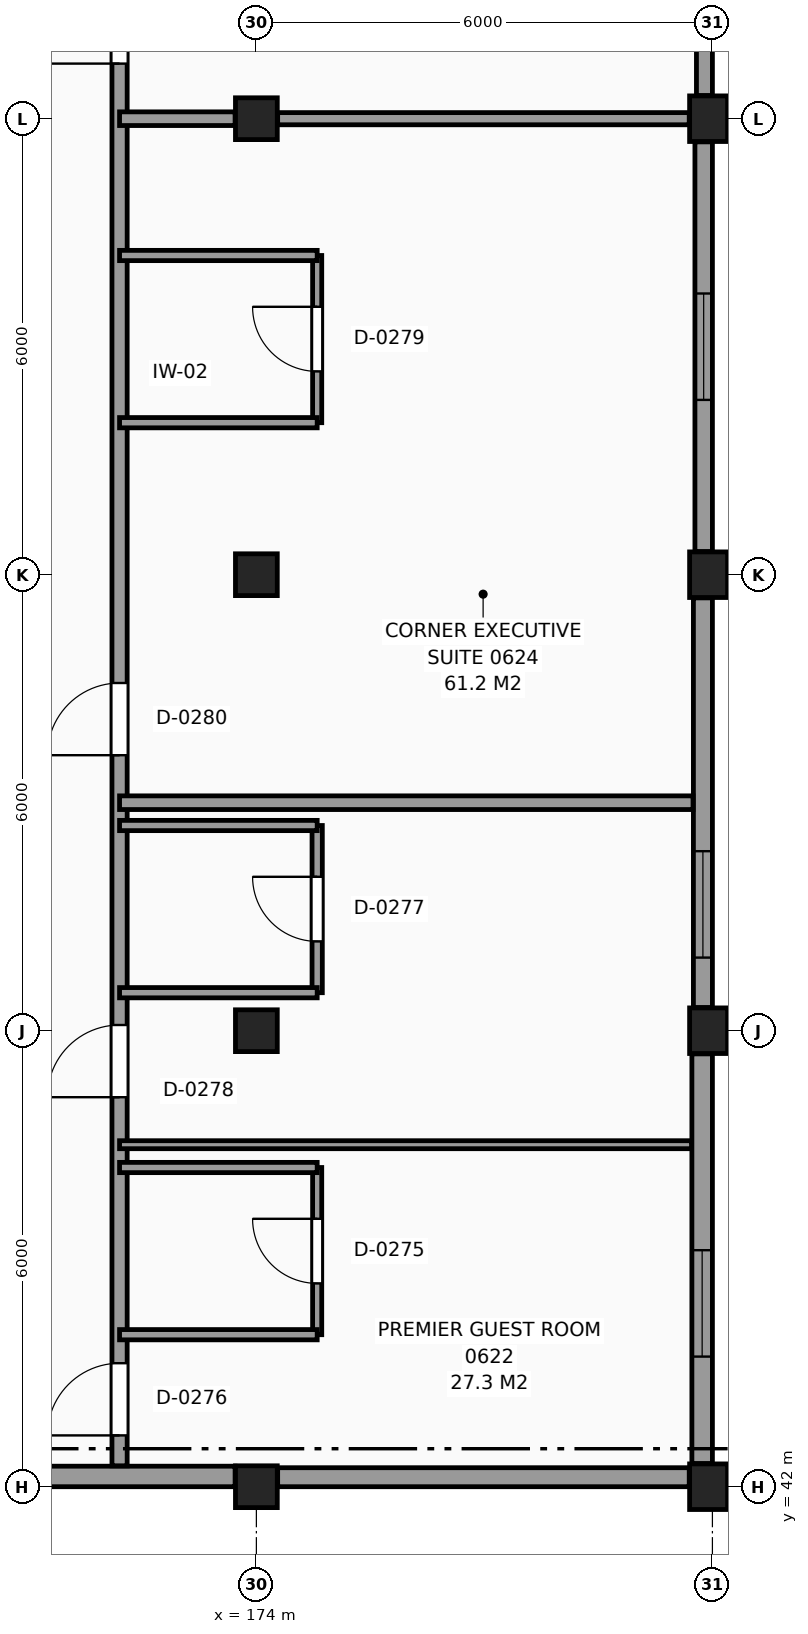
"""IFC4 building model, lengths in metres.
Left out: names, types, materials, properties, quantities, classifications, styles, units other than length and angle.
Written with IfcOpenShell. Run it as: python <this file> out.ifc"""

import sys

from ifc_helpers import new_model, si_unit, direction, frame, frame_2d, origin, origin_2d, place, context, subcontext, project, spatial, rectangle, extrude, element, fill, save


model = new_model("IFC4")
c1 = context("Model", 3, precision=1e-05, world=origin(), true_north=direction((0.0, 1.0)))
c2 = subcontext(c1, "Body", "Model", "MODEL_VIEW")
j1 = project(units=[si_unit("LENGTHUNIT", "METRE"), si_unit("PLANEANGLEUNIT", "RADIAN")], contexts=[c1])
p1 = place(None, origin())
s1 = spatial("IfcSite", under=j1, at=p1, CompositionType="ELEMENT")
p2 = place(p1, origin())
s2 = spatial("IfcBuilding", under=s1, at=p2, CompositionType="ELEMENT")
p3 = place(p2, frame((0.0, 0.0, 28.2)))
s3 = spatial("IfcBuildingStorey", under=s2, at=p3, CompositionType="ELEMENT", Elevation=28.2)
for number, where, z_axis, x_axis in (
    (1, (174.0, 42.0, 0.0), (0.0, 0.0, 1.0), (1.0, 0.0, 0.0)),
    (2, (174.0, 48.0, 0.0), (0.0, 0.0, 1.0), (1.0, 0.0, 0.0)),
    (3, (174.0, 54.0, 0.0), (0.0, 0.0, 1.0), (1.0, 0.0, 0.0)),
    (4, (174.0, 60.0, 0.0), (0.0, 0.0, 1.0), (1.0, 0.0, 0.0)),
):
    element("IfcColumn", number, at=place(p3, frame(where, z_axis=z_axis, x_axis=x_axis)), inside=s3, PredefinedType="COLUMN", context=c2, shape_type="SweptSolid", body=[
        extrude(rectangle(XDim=0.55, YDim=0.55, at=origin_2d()), origin(), (0.0, 0.0, 1.0), 3.3),
    ])
for number, where, z_axis, x_axis in (
    (5, (180.0, 42.0, 0.0), (0.0, 0.0, 1.0), (1.0, 0.0, 0.0)),
    (6, (180.0, 48.0, 0.0), (0.0, 0.0, 1.0), (1.0, 0.0, 0.0)),
    (7, (180.0, 54.0, 0.0), (0.0, 0.0, 1.0), (1.0, 0.0, 0.0)),
    (8, (180.0, 60.0, 0.0), (0.0, 0.0, 1.0), (1.0, 0.0, 0.0)),
):
    element("IfcColumn", number, at=place(p3, frame(where, z_axis=z_axis, x_axis=x_axis)), inside=s3, PredefinedType="COLUMN", context=c2, shape_type="SweptSolid", body=[
        extrude(rectangle(XDim=0.6, YDim=0.6, at=origin_2d()), origin(), (0.0, 0.0, 1.0), 3.3),
    ])
p4 = place(p3, frame((179.865, 42.305, 0.0), z_axis=(0.0, 0.0, 1.0), x_axis=(0.0, 1.0, 0.0)))
e9 = element("IfcWall", 9, at=p4, inside=s3, PredefinedType="SOLIDWALL", context=c2, shape_type="SweptSolid", body=[
    extrude(rectangle(XDim=5.39, YDim=0.27, at=frame_2d((2.695, 0.0))), origin(), (0.0, 0.0, 1.0), 2.43),
])
p5 = place(p4, frame((1.407, 0.0, 0.8)))
e10 = element("IfcOpeningElement", 10, at=p5, cuts=e9, PredefinedType="OPENING", context=c2, shape_type="SweptSolid", body=[
    extrude(rectangle(XDim=1.4, YDim=1.4, at=frame_2d((0.7, 0.7))), frame((0.0, 0.145, 0.0), z_axis=(0.0, -1.0, 0.0), x_axis=(1.0, 0.0, 0.0)), (0.0, 0.0, 1.0), 0.29),
])
p6 = place(p3, frame((179.875, 48.305, 0.0), z_axis=(0.0, 0.0, 1.0), x_axis=(0.0, 1.0, 0.0)))
e11 = element("IfcWall", 11, at=p6, inside=s3, PredefinedType="SOLIDWALL", context=c2, shape_type="SweptSolid", body=[
    extrude(rectangle(XDim=5.39, YDim=0.25, at=frame_2d((2.695, 0.0))), origin(), (0.0, 0.0, 1.0), 2.43),
])
p7 = place(p6, frame((0.657, 0.0, 0.8)))
e12 = element("IfcOpeningElement", 12, at=p7, cuts=e11, PredefinedType="OPENING", context=c2, shape_type="SweptSolid", body=[
    extrude(rectangle(XDim=1.4, YDim=1.4, at=frame_2d((0.7, 0.7))), frame((0.0, 0.135, 0.0), z_axis=(0.0, -1.0, 0.0), x_axis=(1.0, 0.0, 0.0)), (0.0, 0.0, 1.0), 0.27),
])
p8 = place(p3, frame((179.885, 54.305, 0.0), z_axis=(0.0, 0.0, 1.0), x_axis=(0.0, 1.0, 0.0)))
e13 = element("IfcWall", 13, at=p8, inside=s3, PredefinedType="SOLIDWALL", context=c2, shape_type="SweptSolid", body=[
    extrude(rectangle(XDim=5.39, YDim=0.23, at=frame_2d((2.695, 0.0))), origin(), (0.0, 0.0, 1.0), 2.43),
])
p9 = place(p8, frame((1.995, 0.0, 0.8)))
e14 = element("IfcOpeningElement", 14, at=p9, cuts=e13, PredefinedType="OPENING", context=c2, shape_type="SweptSolid", body=[
    extrude(rectangle(XDim=1.4, YDim=1.4, at=frame_2d((0.7, 0.7))), frame((0.0, 0.125, 0.0), z_axis=(0.0, -1.0, 0.0), x_axis=(1.0, 0.0, 0.0)), (0.0, 0.0, 1.0), 0.25),
])
p10 = place(p3, frame((179.895, 60.305, 0.0), z_axis=(0.0, 0.0, 1.0), x_axis=(0.0, 1.0, 0.0)))
e15 = element("IfcWall", 15, at=p10, inside=s3, PredefinedType="SOLIDWALL", context=c2, shape_type="SweptSolid", body=[
    extrude(rectangle(XDim=5.39, YDim=0.21, at=frame_2d((2.695, 0.0))), origin(), (0.0, 0.0, 1.0), 2.43),
])
p11 = place(p10, frame((1.407, 0.0, 0.8)))
e16 = element("IfcOpeningElement", 16, at=p11, cuts=e15, PredefinedType="OPENING", context=c2, shape_type="SweptSolid", body=[
    extrude(rectangle(XDim=1.4, YDim=1.4, at=frame_2d((0.7, 0.7))), frame((0.0, 0.115, 0.0), z_axis=(0.0, -1.0, 0.0), x_axis=(1.0, 0.0, 0.0)), (0.0, 0.0, 1.0), 0.23),
])
p12 = place(p3, frame((168.305, 42.135, 0.0), z_axis=(0.0, 0.0, 1.0), x_axis=(1.0, 0.0, 0.0)))
e17 = element("IfcWall", 17, at=p12, inside=s3, PredefinedType="SOLIDWALL", context=c2, shape_type="SweptSolid", body=[
    extrude(rectangle(XDim=5.415, YDim=0.27, at=frame_2d((2.708, 0.0))), origin(), (0.0, 0.0, 1.0), 2.28),
])
p13 = place(p3, frame((174.28, 42.125, 0.0), z_axis=(0.0, 0.0, 1.0), x_axis=(1.0, 0.0, 0.0)))
e18 = element("IfcWall", 18, at=p13, inside=s3, PredefinedType="SOLIDWALL", context=c2, shape_type="SweptSolid", body=[
    extrude(rectangle(XDim=5.415, YDim=0.25, at=frame_2d((2.708, 0.0))), origin(), (0.0, 0.0, 1.0), 2.28),
])
p14 = place(p3, frame((172.2, 42.275, 0.0), z_axis=(0.0, 0.0, 1.0), x_axis=(0.0, 1.0, 0.0)))
e19 = element("IfcWall", 19, at=p14, inside=s3, PredefinedType="PARTITIONING", context=c2, shape_type="SweptSolid", body=[
    extrude(rectangle(XDim=65.545, YDim=0.2, at=frame_2d((32.772, 0.0))), origin(), (0.0, 0.0, 1.0), 3.08),
])
p15 = place(p14, frame((0.4, 0.0, 0.0)))
e20 = element("IfcOpeningElement", 20, at=p15, cuts=e19, PredefinedType="OPENING", context=c2, shape_type="SweptSolid", body=[
    extrude(rectangle(XDim=0.95, YDim=2.1, at=frame_2d((0.475, 1.05))), frame((0.0, 0.11, 0.0), z_axis=(0.0, -1.0, 0.0), x_axis=(1.0, 0.0, 0.0)), (0.0, 0.0, 1.0), 0.22),
])
p16 = place(p14, frame((4.85, 0.0, 0.0)))
e21 = element("IfcOpeningElement", 21, at=p16, cuts=e19, PredefinedType="OPENING", context=c2, shape_type="SweptSolid", body=[
    extrude(rectangle(XDim=0.95, YDim=2.1, at=frame_2d((0.475, 1.05))), frame((0.0, 0.11, 0.0), z_axis=(0.0, -1.0, 0.0), x_axis=(1.0, 0.0, 0.0)), (0.0, 0.0, 1.0), 0.22),
])
p17 = place(p14, frame((9.35, 0.0, 0.0)))
e22 = element("IfcOpeningElement", 22, at=p17, cuts=e19, PredefinedType="OPENING", context=c2, shape_type="SweptSolid", body=[
    extrude(rectangle(XDim=0.95, YDim=2.1, at=frame_2d((0.475, 1.05))), frame((0.0, 0.11, 0.0), z_axis=(0.0, -1.0, 0.0), x_axis=(1.0, 0.0, 0.0)), (0.0, 0.0, 1.0), 0.22),
])
p18 = place(p14, frame((18.45, 0.0, 0.0)))
e23 = element("IfcOpeningElement", 23, at=p18, cuts=e19, PredefinedType="OPENING", context=c2, shape_type="SweptSolid", body=[
    extrude(rectangle(XDim=0.95, YDim=2.1, at=frame_2d((0.475, 1.05))), frame((0.0, 0.11, 0.0), z_axis=(0.0, -1.0, 0.0), x_axis=(1.0, 0.0, 0.0)), (0.0, 0.0, 1.0), 0.22),
])
p19 = place(p14, frame((22.85, 0.0, 0.0)))
e24 = element("IfcOpeningElement", 24, at=p19, cuts=e19, PredefinedType="OPENING", context=c2, shape_type="SweptSolid", body=[
    extrude(rectangle(XDim=0.95, YDim=2.1, at=frame_2d((0.475, 1.05))), frame((0.0, 0.11, 0.0), z_axis=(0.0, -1.0, 0.0), x_axis=(1.0, 0.0, 0.0)), (0.0, 0.0, 1.0), 0.22),
])
p20 = place(p14, frame((30.05, 0.0, 0.0)))
e25 = element("IfcOpeningElement", 25, at=p20, cuts=e19, PredefinedType="OPENING", context=c2, shape_type="SweptSolid", body=[
    extrude(rectangle(XDim=0.95, YDim=2.1, at=frame_2d((0.475, 1.05))), frame((0.0, 0.11, 0.0), z_axis=(0.0, -1.0, 0.0), x_axis=(1.0, 0.0, 0.0)), (0.0, 0.0, 1.0), 0.22),
])
p21 = place(p14, frame((38.3, 0.0, 0.0)))
e26 = element("IfcOpeningElement", 26, at=p21, cuts=e19, PredefinedType="OPENING", context=c2, shape_type="SweptSolid", body=[
    extrude(rectangle(XDim=0.95, YDim=2.1, at=frame_2d((0.475, 1.05))), frame((0.0, 0.11, 0.0), z_axis=(0.0, -1.0, 0.0), x_axis=(1.0, 0.0, 0.0)), (0.0, 0.0, 1.0), 0.22),
])
p22 = place(p14, frame((40.85, 0.0, 0.0)))
e27 = element("IfcOpeningElement", 27, at=p22, cuts=e19, PredefinedType="OPENING", context=c2, shape_type="SweptSolid", body=[
    extrude(rectangle(XDim=0.95, YDim=2.1, at=frame_2d((0.475, 1.05))), frame((0.0, 0.11, 0.0), z_axis=(0.0, -1.0, 0.0), x_axis=(1.0, 0.0, 0.0)), (0.0, 0.0, 1.0), 0.22),
])
p23 = place(p14, frame((48.05, 0.0, 0.0)))
e28 = element("IfcOpeningElement", 28, at=p23, cuts=e19, PredefinedType="OPENING", context=c2, shape_type="SweptSolid", body=[
    extrude(rectangle(XDim=0.95, YDim=2.1, at=frame_2d((0.475, 1.05))), frame((0.0, 0.11, 0.0), z_axis=(0.0, -1.0, 0.0), x_axis=(1.0, 0.0, 0.0)), (0.0, 0.0, 1.0), 0.22),
])
p24 = place(p14, frame((52.25, 0.0, 0.0)))
e29 = element("IfcOpeningElement", 29, at=p24, cuts=e19, PredefinedType="OPENING", context=c2, shape_type="SweptSolid", body=[
    extrude(rectangle(XDim=0.95, YDim=2.1, at=frame_2d((0.475, 1.05))), frame((0.0, 0.11, 0.0), z_axis=(0.0, -1.0, 0.0), x_axis=(1.0, 0.0, 0.0)), (0.0, 0.0, 1.0), 0.22),
])
p25 = place(p14, frame((54.45, 0.0, 0.0)))
e30 = element("IfcOpeningElement", 30, at=p25, cuts=e19, PredefinedType="OPENING", context=c2, shape_type="SweptSolid", body=[
    extrude(rectangle(XDim=0.95, YDim=2.1, at=frame_2d((0.475, 1.05))), frame((0.0, 0.11, 0.0), z_axis=(0.0, -1.0, 0.0), x_axis=(1.0, 0.0, 0.0)), (0.0, 0.0, 1.0), 0.22),
])
p26 = place(p14, frame((60.45, 0.0, 0.0)))
e31 = element("IfcOpeningElement", 31, at=p26, cuts=e19, PredefinedType="OPENING", context=c2, shape_type="SweptSolid", body=[
    extrude(rectangle(XDim=0.95, YDim=2.1, at=frame_2d((0.475, 1.05))), frame((0.0, 0.11, 0.0), z_axis=(0.0, -1.0, 0.0), x_axis=(1.0, 0.0, 0.0)), (0.0, 0.0, 1.0), 0.22),
])
p27 = place(p3, frame((174.8, 44.0, 0.0), z_axis=(0.0, 0.0, 1.0), x_axis=(0.0, 1.0, 0.0)))
e32 = element("IfcWall", 32, at=p27, inside=s3, PredefinedType="PARTITIONING", context=c2, shape_type="SweptSolid", body=[
    extrude(rectangle(XDim=2.2, YDim=0.12, at=frame_2d((1.1, 0.0))), origin(), (0.0, 0.0, 1.0), 3.08),
])
p28 = place(p27, frame((0.675, 0.0, 0.0)))
e33 = element("IfcOpeningElement", 33, at=p28, cuts=e32, PredefinedType="OPENING", context=c2, shape_type="SweptSolid", body=[
    extrude(rectangle(XDim=0.85, YDim=2.1, at=frame_2d((0.425, 1.05))), frame((0.0, 0.07, 0.0), z_axis=(0.0, -1.0, 0.0), x_axis=(1.0, 0.0, 0.0)), (0.0, 0.0, 1.0), 0.14),
])
p29 = place(p3, frame((174.8, 48.5, 0.0), z_axis=(0.0, 0.0, 1.0), x_axis=(0.0, 1.0, 0.0)))
e34 = element("IfcWall", 34, at=p29, inside=s3, PredefinedType="PARTITIONING", context=c2, shape_type="SweptSolid", body=[
    extrude(rectangle(XDim=2.2, YDim=0.135, at=frame_2d((1.1, 0.0))), origin(), (0.0, 0.0, 1.0), 3.08),
])
p30 = place(p29, frame((0.675, 0.0, 0.0)))
e35 = element("IfcOpeningElement", 35, at=p30, cuts=e34, PredefinedType="OPENING", context=c2, shape_type="SweptSolid", body=[
    extrude(rectangle(XDim=0.85, YDim=2.1, at=frame_2d((0.425, 1.05))), frame((0.0, 0.078, 0.0), z_axis=(0.0, -1.0, 0.0), x_axis=(1.0, 0.0, 0.0)), (0.0, 0.0, 1.0), 0.155),
])
p31 = place(p3, frame((174.8, 56.0, 0.0), z_axis=(0.0, 0.0, 1.0), x_axis=(0.0, 1.0, 0.0)))
e36 = element("IfcWall", 36, at=p31, inside=s3, PredefinedType="PARTITIONING", context=c2, shape_type="SweptSolid", body=[
    extrude(rectangle(XDim=2.2, YDim=0.12, at=frame_2d((1.1, 0.0))), origin(), (0.0, 0.0, 1.0), 3.08),
])
p32 = place(p31, frame((0.675, 0.0, 0.0)))
e37 = element("IfcOpeningElement", 37, at=p32, cuts=e36, PredefinedType="OPENING", context=c2, shape_type="SweptSolid", body=[
    extrude(rectangle(XDim=0.85, YDim=2.1, at=frame_2d((0.425, 1.05))), frame((0.0, 0.07, 0.0), z_axis=(0.0, -1.0, 0.0), x_axis=(1.0, 0.0, 0.0)), (0.0, 0.0, 1.0), 0.14),
])
for number, where, z_axis, x_axis in (
    (38, (172.2, 44.0, 0.0), (0.0, 0.0, 1.0), (1.0, 0.0, 0.0)),
    (39, (172.2, 46.2, 0.0), (0.0, 0.0, 1.0), (1.0, 0.0, 0.0)),
):
    element("IfcWall", number, at=place(p3, frame(where, z_axis=z_axis, x_axis=x_axis)), inside=s3, PredefinedType="PARTITIONING", context=c2, shape_type="SweptSolid", body=[
        extrude(rectangle(XDim=2.6, YDim=0.135, at=frame_2d((1.3, 0.0))), origin(), (0.0, 0.0, 1.0), 3.08),
    ])
p33 = place(p3, frame((172.2, 46.5, 0.0), z_axis=(0.0, 0.0, 1.0), x_axis=(1.0, 0.0, 0.0)))
e40 = element("IfcWall", 40, at=p33, inside=s3, PredefinedType="PARTITIONING", context=c2, shape_type="SweptSolid", body=[
    extrude(rectangle(XDim=7.525, YDim=0.105, at=frame_2d((3.763, 0.0))), origin(), (0.0, 0.0, 1.0), 3.08),
])
for number, where, z_axis, x_axis in (
    (41, (172.2, 48.5, 0.0), (0.0, 0.0, 1.0), (1.0, 0.0, 0.0)),
    (42, (172.2, 50.7, 0.0), (0.0, 0.0, 1.0), (1.0, 0.0, 0.0)),
):
    element("IfcWall", number, at=place(p3, frame(where, z_axis=z_axis, x_axis=x_axis)), inside=s3, PredefinedType="PARTITIONING", context=c2, shape_type="SweptSolid", body=[
        extrude(rectangle(XDim=2.6, YDim=0.135, at=frame_2d((1.3, 0.0))), origin(), (0.0, 0.0, 1.0), 3.08),
    ])
p34 = place(p3, frame((172.2, 51.0, 0.0), z_axis=(0.0, 0.0, 1.0), x_axis=(1.0, 0.0, 0.0)))
e43 = element("IfcWall", 43, at=p34, inside=s3, PredefinedType="PARTITIONING", context=c2, shape_type="SweptSolid", body=[
    extrude(rectangle(XDim=7.545, YDim=0.18, at=frame_2d((3.772, 0.0))), origin(), (0.0, 0.0, 1.0), 3.08),
])
for number, where, z_axis, x_axis in (
    (44, (172.2, 56.0, 0.0), (0.0, 0.0, 1.0), (1.0, 0.0, 0.0)),
    (45, (172.2, 58.2, 0.0), (0.0, 0.0, 1.0), (1.0, 0.0, 0.0)),
):
    element("IfcWall", number, at=place(p3, frame(where, z_axis=z_axis, x_axis=x_axis)), inside=s3, PredefinedType="PARTITIONING", context=c2, shape_type="SweptSolid", body=[
        extrude(rectangle(XDim=2.6, YDim=0.135, at=frame_2d((1.3, 0.0))), origin(), (0.0, 0.0, 1.0), 3.08),
    ])
p35 = place(p3, frame((172.2, 60.0, 0.0), z_axis=(0.0, 0.0, 1.0), x_axis=(1.0, 0.0, 0.0)))
e46 = element("IfcWall", 46, at=p35, inside=s3, PredefinedType="PARTITIONING", context=c2, shape_type="SweptSolid", body=[
    extrude(rectangle(XDim=1.52, YDim=0.18, at=frame_2d((0.76, 0.0))), origin(), (0.0, 0.0, 1.0), 2.28),
])
p36 = place(p3, frame((174.28, 60.0, 0.0), z_axis=(0.0, 0.0, 1.0), x_axis=(1.0, 0.0, 0.0)))
e47 = element("IfcWall", 47, at=p36, inside=s3, PredefinedType="PARTITIONING", context=c2, shape_type="SweptSolid", body=[
    extrude(rectangle(XDim=5.415, YDim=0.16, at=frame_2d((2.708, 0.0))), origin(), (0.0, 0.0, 1.0), 2.28),
])
p37 = place(p5, origin())
e48 = element("IfcWindow", 48, at=p37, inside=s3, PartitioningType="SINGLE_PANEL", PredefinedType="WINDOW", context=c2, shape_type="SweptSolid", body=[
    extrude(rectangle(XDim=1.4, YDim=1.4, at=frame_2d((0.7, 0.7))), frame((0.0, 0.03, 0.0), z_axis=(0.0, -1.0, 0.0), x_axis=(1.0, 0.0, 0.0)), (0.0, 0.0, 1.0), 0.06),
])
fill(e10, e48)
p38 = place(p7, origin())
e49 = element("IfcWindow", 49, at=p38, inside=s3, PartitioningType="SINGLE_PANEL", PredefinedType="WINDOW", context=c2, shape_type="SweptSolid", body=[
    extrude(rectangle(XDim=1.4, YDim=1.4, at=frame_2d((0.7, 0.7))), frame((0.0, 0.03, 0.0), z_axis=(0.0, -1.0, 0.0), x_axis=(1.0, 0.0, 0.0)), (0.0, 0.0, 1.0), 0.06),
])
fill(e12, e49)
p39 = place(p9, origin())
e50 = element("IfcWindow", 50, at=p39, inside=s3, PartitioningType="SINGLE_PANEL", PredefinedType="WINDOW", context=c2, shape_type="SweptSolid", body=[
    extrude(rectangle(XDim=1.4, YDim=1.4, at=frame_2d((0.7, 0.7))), frame((0.0, 0.03, 0.0), z_axis=(0.0, -1.0, 0.0), x_axis=(1.0, 0.0, 0.0)), (0.0, 0.0, 1.0), 0.06),
])
fill(e14, e50)
p40 = place(p28, origin())
e51 = element("IfcDoor", 51, at=p40, inside=s3, OperationType="SINGLE_SWING_RIGHT", PredefinedType="DOOR", context=c2, shape_type="SweptSolid", body=[
    extrude(rectangle(XDim=0.85, YDim=2.1, at=frame_2d((0.425, 1.05))), frame((0.0, 0.025, 0.0), z_axis=(0.0, -1.0, 0.0), x_axis=(1.0, 0.0, 0.0)), (0.0, 0.0, 1.0), 0.05),
])
fill(e33, e51)
p41 = place(p15, origin())
e52 = element("IfcDoor", 52, at=p41, inside=s3, OperationType="SINGLE_SWING_LEFT", PredefinedType="DOOR", context=c2, shape_type="SweptSolid", body=[
    extrude(rectangle(XDim=0.95, YDim=2.1, at=frame_2d((0.475, 1.05))), frame((0.0, 0.025, 0.0), z_axis=(0.0, -1.0, 0.0), x_axis=(1.0, 0.0, 0.0)), (0.0, 0.0, 1.0), 0.05),
])
fill(e20, e52)
p42 = place(p30, origin())
e53 = element("IfcDoor", 53, at=p42, inside=s3, OperationType="SINGLE_SWING_RIGHT", PredefinedType="DOOR", context=c2, shape_type="SweptSolid", body=[
    extrude(rectangle(XDim=0.85, YDim=2.1, at=frame_2d((0.425, 1.05))), frame((0.0, 0.025, 0.0), z_axis=(0.0, -1.0, 0.0), x_axis=(1.0, 0.0, 0.0)), (0.0, 0.0, 1.0), 0.05),
])
fill(e35, e53)
p43 = place(p16, origin())
e54 = element("IfcDoor", 54, at=p43, inside=s3, OperationType="SINGLE_SWING_LEFT", PredefinedType="DOOR", context=c2, shape_type="SweptSolid", body=[
    extrude(rectangle(XDim=0.95, YDim=2.1, at=frame_2d((0.475, 1.05))), frame((0.0, 0.025, 0.0), z_axis=(0.0, -1.0, 0.0), x_axis=(1.0, 0.0, 0.0)), (0.0, 0.0, 1.0), 0.05),
])
fill(e21, e54)
p44 = place(p32, origin())
e55 = element("IfcDoor", 55, at=p44, inside=s3, OperationType="SINGLE_SWING_RIGHT", PredefinedType="DOOR", context=c2, shape_type="SweptSolid", body=[
    extrude(rectangle(XDim=0.85, YDim=2.1, at=frame_2d((0.425, 1.05))), frame((0.0, 0.025, 0.0), z_axis=(0.0, -1.0, 0.0), x_axis=(1.0, 0.0, 0.0)), (0.0, 0.0, 1.0), 0.05),
])
fill(e37, e55)
p45 = place(p17, origin())
e56 = element("IfcDoor", 56, at=p45, inside=s3, OperationType="SINGLE_SWING_LEFT", PredefinedType="DOOR", context=c2, shape_type="SweptSolid", body=[
    extrude(rectangle(XDim=0.95, YDim=2.1, at=frame_2d((0.475, 1.05))), frame((0.0, 0.025, 0.0), z_axis=(0.0, -1.0, 0.0), x_axis=(1.0, 0.0, 0.0)), (0.0, 0.0, 1.0), 0.05),
])
fill(e22, e56)
p46 = place(p18, origin())
e57 = element("IfcDoor", 57, at=p46, inside=s3, OperationType="SINGLE_SWING_LEFT", PredefinedType="DOOR", context=c2, shape_type="SweptSolid", body=[
    extrude(rectangle(XDim=0.95, YDim=2.1, at=frame_2d((0.475, 1.05))), frame((0.0, 0.025, 0.0), z_axis=(0.0, -1.0, 0.0), x_axis=(1.0, 0.0, 0.0)), (0.0, 0.0, 1.0), 0.05),
])
fill(e23, e57)
save(model, sys.argv[1])
